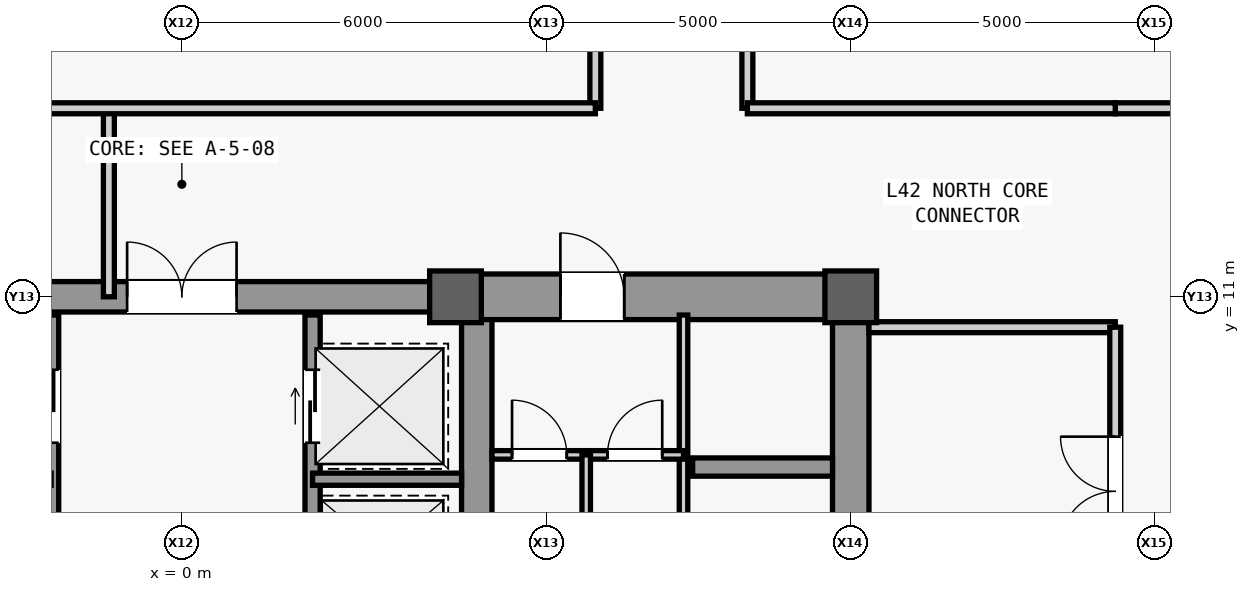
"""IFC4 building model, lengths in metres.
Left out: names, types, materials, properties, quantities, classifications, styles, units other than length and angle.
Written with IfcOpenShell. Run it as: python <this file> out.ifc"""

import sys

from ifc_helpers import new_model, si_unit, direction, frame, frame_2d, origin, origin_2d, place, context, subcontext, project, spatial, rectangle, extrude, source, transform, mapped, element, fill, save


model = new_model("IFC4")
c1 = context("Model", 3, precision=1e-05, world=origin(), true_north=direction((0.0, 1.0)))
c2 = subcontext(c1, "Body", "Model", "MODEL_VIEW")
j1 = project(units=[si_unit("LENGTHUNIT", "METRE"), si_unit("PLANEANGLEUNIT", "RADIAN")], contexts=[c1])
p1 = place(None, origin())
s1 = spatial("IfcSite", under=j1, at=p1, CompositionType="ELEMENT")
p2 = place(p1, origin())
s2 = spatial("IfcBuilding", under=s1, at=p2, CompositionType="ELEMENT")
p3 = place(p2, frame((0.0, 0.0, 183.1)))
s3 = spatial("IfcBuildingStorey", under=s2, at=p3, CompositionType="ELEMENT", Elevation=183.1)
m1 = source(origin(), c2, "Body", "SweptSolid", [
    extrude(rectangle(XDim=22.0, YDim=0.6, at=frame_2d((11.0, 0.0))), origin(), (0.0, 0.0, 1.0), 3.78),
])
p4 = place(p3, frame((11.0, -11.0, 0.0), z_axis=(0.0, 0.0, 1.0), x_axis=(0.0, 1.0, 0.0)))
e1 = element("IfcWall", 1, at=p4, inside=s3, PredefinedType="SHEAR", context=c2, shape_type="MappedRepresentation", body=[
    mapped(m1, transform((0.0, 0.0, 0.0), scale=1.0)),
])
m2 = source(origin(), c2, "Body", "SweptSolid", [
    extrude(rectangle(XDim=1.1, YDim=2.2, at=frame_2d((0.55, 1.1))), frame((0.0, 0.31, 0.0), z_axis=(0.0, -1.0, 0.0), x_axis=(1.0, 0.0, 0.0)), (0.0, 0.0, 1.0), 0.62),
])
p5 = place(p4, frame((0.8, 0.0, 0.0)))
e2 = element("IfcOpeningElement", 2, at=p5, cuts=e1, PredefinedType="OPENING", context=c2, shape_type="MappedRepresentation", body=[
    mapped(m2, transform((0.0, 0.0, 0.0), scale=1.0)),
])
m3 = source(origin(), c2, "Body", "SweptSolid", [
    extrude(rectangle(XDim=0.9, YDim=2.15, at=frame_2d((0.45, 1.075))), frame((0.0, 0.31, 0.0), z_axis=(0.0, -1.0, 0.0), x_axis=(1.0, 0.0, 0.0)), (0.0, 0.0, 1.0), 0.62),
])
p6 = place(p4, frame((6.85, 0.0, 0.0)))
e3 = element("IfcOpeningElement", 3, at=p6, cuts=e1, PredefinedType="OPENING", context=c2, shape_type="MappedRepresentation", body=[
    mapped(m3, transform((0.0, 0.0, 0.0), scale=1.0)),
])
m4 = source(origin(), c2, "Body", "SweptSolid", [
    extrude(rectangle(XDim=1.3, YDim=2.3, at=frame_2d((0.65, 1.15))), frame((0.0, 0.31, 0.0), z_axis=(0.0, -1.0, 0.0), x_axis=(1.0, 0.0, 0.0)), (0.0, 0.0, 1.0), 0.62),
])
p7 = place(p4, frame((2.7, 0.0, 0.0)))
e4 = element("IfcOpeningElement", 4, at=p7, cuts=e1, PredefinedType="OPENING", context=c2, shape_type="MappedRepresentation", body=[
    mapped(m4, transform((0.0, 0.0, 0.0), scale=1.0)),
])
p8 = place(p4, frame((13.35, 0.0, 0.0)))
e5 = element("IfcOpeningElement", 5, at=p8, cuts=e1, PredefinedType="OPENING", context=c2, shape_type="MappedRepresentation", body=[
    mapped(m4, transform((0.0, 0.0, 0.0), scale=1.0)),
])
m5 = source(origin(), c2, "Body", "SweptSolid", [
    extrude(rectangle(XDim=21.4, YDim=0.5, at=frame_2d((10.7, 0.0))), origin(), (0.0, 0.0, 1.0), 3.78),
])
p9 = place(p3, frame((4.85, -10.7, 0.0), z_axis=(0.0, 0.0, 1.0), x_axis=(0.0, 1.0, 0.0)))
e6 = element("IfcWall", 6, at=p9, inside=s3, PredefinedType="SHEAR", context=c2, shape_type="MappedRepresentation", body=[
    mapped(m5, transform((0.0, 0.0, 0.0), scale=1.0)),
])
m6 = source(origin(), c2, "Body", "SweptSolid", [
    extrude(rectangle(XDim=5.85, YDim=0.75, at=frame_2d((2.925, 0.0))), origin(), (0.0, 0.0, 1.0), 3.78),
])
p10 = place(p3, frame((4.85, 11.0, 0.0), z_axis=(0.0, 0.0, 1.0), x_axis=(1.0, 0.0, 0.0)))
e7 = element("IfcWall", 7, at=p10, inside=s3, PredefinedType="SHEAR", context=c2, shape_type="MappedRepresentation", body=[
    mapped(m6, transform((0.0, 0.0, 0.0), scale=1.0)),
])
m7 = source(origin(), c2, "Body", "SweptSolid", [
    extrude(rectangle(XDim=1.05, YDim=2.2, at=frame_2d((0.525, 1.1))), frame((0.0, 0.385, 0.0), z_axis=(0.0, -1.0, 0.0), x_axis=(1.0, 0.0, 0.0)), (0.0, 0.0, 1.0), 0.77),
])
p11 = place(p10, frame((1.375, 0.0, 0.0)))
e8 = element("IfcOpeningElement", 8, at=p11, cuts=e7, PredefinedType="OPENING", context=c2, shape_type="MappedRepresentation", body=[
    mapped(m7, transform((0.0, 0.0, 0.0), scale=1.0)),
])
m8 = source(origin(), c2, "Body", "SweptSolid", [
    extrude(rectangle(XDim=9.2, YDim=0.5, at=frame_2d((4.6, 0.0))), origin(), (0.0, 0.0, 1.0), 3.78),
])
p12 = place(p3, frame((-4.6, 11.0, 0.0), z_axis=(0.0, 0.0, 1.0), x_axis=(1.0, 0.0, 0.0)))
e9 = element("IfcWall", 9, at=p12, inside=s3, PredefinedType="SHEAR", context=c2, shape_type="MappedRepresentation", body=[
    mapped(m8, transform((0.0, 0.0, 0.0), scale=1.0)),
])
m9 = source(origin(), c2, "Body", "SweptSolid", [
    extrude(rectangle(XDim=1.8, YDim=2.25, at=frame_2d((0.9, 1.125))), frame((0.0, 0.26, 0.0), z_axis=(0.0, -1.0, 0.0), x_axis=(1.0, 0.0, 0.0)), (0.0, 0.0, 1.0), 0.52),
])
p13 = place(p12, frame((3.7, 0.0, 0.0)))
e10 = element("IfcOpeningElement", 10, at=p13, cuts=e9, PredefinedType="OPENING", context=c2, shape_type="MappedRepresentation", body=[
    mapped(m9, transform((0.0, 0.0, 0.0), scale=1.0)),
])
m10 = source(origin(), c2, "Body", "SweptSolid", [
    extrude(rectangle(XDim=0.85, YDim=0.85, at=origin_2d()), origin(), (0.0, 0.0, 1.0), 4.0),
])
for number, where, z_axis, x_axis in (
    (11, (4.5, 11.0, 0.0), (0.0, 0.0, 1.0), (1.0, 0.0, 0.0)),
    (12, (11.0, 11.0, 0.0), (0.0, 0.0, 1.0), (1.0, 0.0, 0.0)),
):
    element("IfcColumn", number, at=place(p3, frame(where, z_axis=z_axis, x_axis=x_axis)), inside=s3, PredefinedType="COLUMN", context=c2, shape_type="MappedRepresentation", body=[
        mapped(m10, transform((0.0, 0.0, 0.0), scale=1.0)),
    ])
m11 = source(origin(), c2, "Body", "SweptSolid", [
    extrude(rectangle(XDim=2.3, YDim=0.3, at=frame_2d((1.15, 0.0))), origin(), (0.0, 0.0, 1.0), 3.78),
])
p14 = place(p3, frame((8.4, 8.2, 0.0), z_axis=(0.0, 0.0, 1.0), x_axis=(1.0, 0.0, 0.0)))
e13 = element("IfcWall", 13, at=p14, inside=s3, PredefinedType="SHEAR", context=c2, shape_type="MappedRepresentation", body=[
    mapped(m11, transform((0.0, 0.0, 0.0), scale=1.0)),
])
m12 = source(origin(), c2, "Body", "SweptSolid", [
    extrude(rectangle(XDim=9.4, YDim=0.14, at=frame_2d((4.7, 0.0))), origin(), (0.0, 0.0, 1.0), 3.78),
])
p15 = place(p3, frame((8.25, 1.3, 0.0), z_axis=(0.0, 0.0, 1.0), x_axis=(0.0, 1.0, 0.0)))
e14 = element("IfcWall", 14, at=p15, inside=s3, PredefinedType="PARTITIONING", context=c2, shape_type="MappedRepresentation", body=[
    mapped(m12, transform((0.0, 0.0, 0.0), scale=1.0)),
])
m13 = source(origin(), c2, "Body", "SweptSolid", [
    extrude(rectangle(XDim=3.15, YDim=0.14, at=frame_2d((1.575, 0.0))), origin(), (0.0, 0.0, 1.0), 3.78),
])
p16 = place(p3, frame((5.1, 8.4, 0.0), z_axis=(0.0, 0.0, 1.0), x_axis=(1.0, 0.0, 0.0)))
e15 = element("IfcWall", 15, at=p16, inside=s3, PredefinedType="PARTITIONING", context=c2, shape_type="MappedRepresentation", body=[
    mapped(m13, transform((0.0, 0.0, 0.0), scale=1.0)),
])
m14 = source(origin(), c2, "Body", "SweptSolid", [
    extrude(rectangle(XDim=0.9, YDim=2.15, at=frame_2d((0.45, 1.075))), frame((0.0, 0.08, 0.0), z_axis=(0.0, -1.0, 0.0), x_axis=(1.0, 0.0, 0.0)), (0.0, 0.0, 1.0), 0.16),
])
p17 = place(p16, frame((0.33, 0.0, 0.0)))
e16 = element("IfcOpeningElement", 16, at=p17, cuts=e15, PredefinedType="OPENING", context=c2, shape_type="MappedRepresentation", body=[
    mapped(m14, transform((0.0, 0.0, 0.0), scale=1.0)),
])
p18 = place(p16, frame((1.9, 0.0, 0.0)))
e17 = element("IfcOpeningElement", 17, at=p18, cuts=e15, PredefinedType="OPENING", context=c2, shape_type="MappedRepresentation", body=[
    mapped(m14, transform((0.0, 0.0, 0.0), scale=1.0)),
])
m15 = source(origin(), c2, "Body", "SweptSolid", [
    extrude(rectangle(XDim=7.1, YDim=0.14, at=frame_2d((3.55, 0.0))), origin(), (0.0, 0.0, 1.0), 3.78),
])
p19 = place(p3, frame((6.65, 1.3, 0.0), z_axis=(0.0, 0.0, 1.0), x_axis=(0.0, 1.0, 0.0)))
e18 = element("IfcWall", 18, at=p19, inside=s3, PredefinedType="PARTITIONING", context=c2, shape_type="MappedRepresentation", body=[
    mapped(m15, transform((0.0, 0.0, 0.0), scale=1.0)),
])
p20 = place(p19, frame((1.3, 0.0, 0.0)))
e19 = element("IfcOpeningElement", 19, at=p20, cuts=e18, PredefinedType="OPENING", context=c2, shape_type="MappedRepresentation", body=[
    mapped(m14, transform((0.0, 0.0, 0.0), scale=1.0)),
])
m16 = source(origin(), c2, "Body", "SweptSolid", [
    extrude(rectangle(XDim=4.05, YDim=0.18, at=frame_2d((2.025, 0.0))), origin(), (0.0, 0.0, 1.0), 3.78),
])
p21 = place(p3, frame((11.3, 10.5, 0.0), z_axis=(0.0, 0.0, 1.0), x_axis=(1.0, 0.0, 0.0)))
e20 = element("IfcWall", 20, at=p21, inside=s3, PredefinedType="PARTITIONING", context=c2, shape_type="MappedRepresentation", body=[
    mapped(m16, transform((0.0, 0.0, 0.0), scale=1.0)),
])
m17 = source(origin(), c2, "Body", "SweptSolid", [
    extrude(rectangle(XDim=16.6, YDim=0.18, at=frame_2d((8.3, 0.0))), origin(), (0.0, 0.0, 1.0), 3.78),
])
p22 = place(p3, frame((15.35, -6.1, 0.0), z_axis=(0.0, 0.0, 1.0), x_axis=(0.0, 1.0, 0.0)))
e21 = element("IfcWall", 21, at=p22, inside=s3, PredefinedType="PARTITIONING", context=c2, shape_type="MappedRepresentation", body=[
    mapped(m17, transform((0.0, 0.0, 0.0), scale=1.0)),
])
m18 = source(origin(), c2, "Body", "SweptSolid", [
    extrude(rectangle(XDim=1.8, YDim=2.25, at=frame_2d((0.9, 1.125))), frame((0.0, 0.1, 0.0), z_axis=(0.0, -1.0, 0.0), x_axis=(1.0, 0.0, 0.0)), (0.0, 0.0, 1.0), 0.2),
])
p23 = place(p22, frame((2.7, 0.0, 0.0)))
e22 = element("IfcOpeningElement", 22, at=p23, cuts=e21, PredefinedType="OPENING", context=c2, shape_type="MappedRepresentation", body=[
    mapped(m18, transform((0.0, 0.0, 0.0), scale=1.0)),
])
p24 = place(p22, frame((13.0, 0.0, 0.0)))
e23 = element("IfcOpeningElement", 23, at=p24, cuts=e21, PredefinedType="OPENING", context=c2, shape_type="MappedRepresentation", body=[
    mapped(m18, transform((0.0, 0.0, 0.0), scale=1.0)),
])
m19 = source(origin(), c2, "Body", "SweptSolid", [
    extrude(rectangle(XDim=5.4, YDim=0.25, at=frame_2d((2.7, 0.0))), origin(), (0.0, 0.0, 1.0), 3.78),
])
p25 = place(p3, frame((-2.15, 5.3, 0.0), z_axis=(0.0, 0.0, 1.0), x_axis=(0.0, 1.0, 0.0)))
e24 = element("IfcWall", 24, at=p25, inside=s3, PredefinedType="SHEAR", context=c2, shape_type="MappedRepresentation", body=[
    mapped(m19, transform((0.0, 0.0, 0.0), scale=1.0)),
])
m20 = source(origin(), c2, "Body", "SweptSolid", [
    extrude(rectangle(XDim=1.2, YDim=2.3, at=frame_2d((0.6, 1.15))), frame((0.0, 0.135, 0.0), z_axis=(0.0, -1.0, 0.0), x_axis=(1.0, 0.0, 0.0)), (0.0, 0.0, 1.0), 0.27),
])
p26 = place(p25, frame((3.3, 0.0, 0.0)))
e25 = element("IfcOpeningElement", 25, at=p26, cuts=e24, PredefinedType="OPENING", context=c2, shape_type="MappedRepresentation", body=[
    mapped(m20, transform((0.0, 0.0, 0.0), scale=1.0)),
])
p27 = place(p25, frame((0.9, 0.0, 0.0)))
e26 = element("IfcOpeningElement", 26, at=p27, cuts=e24, PredefinedType="OPENING", context=c2, shape_type="MappedRepresentation", body=[
    mapped(m20, transform((0.0, 0.0, 0.0), scale=1.0)),
])
p28 = place(p3, frame((2.15, 5.3, 0.0), z_axis=(0.0, 0.0, 1.0), x_axis=(0.0, 1.0, 0.0)))
e27 = element("IfcWall", 27, at=p28, inside=s3, PredefinedType="SHEAR", context=c2, shape_type="MappedRepresentation", body=[
    mapped(m19, transform((0.0, 0.0, 0.0), scale=1.0)),
])
p29 = place(p28, frame((3.3, 0.0, 0.0)))
e28 = element("IfcOpeningElement", 28, at=p29, cuts=e27, PredefinedType="OPENING", context=c2, shape_type="MappedRepresentation", body=[
    mapped(m20, transform((0.0, 0.0, 0.0), scale=1.0)),
])
p30 = place(p28, frame((0.9, 0.0, 0.0)))
e29 = element("IfcOpeningElement", 29, at=p30, cuts=e27, PredefinedType="OPENING", context=c2, shape_type="MappedRepresentation", body=[
    mapped(m20, transform((0.0, 0.0, 0.0), scale=1.0)),
])
m21 = source(origin(), c2, "Body", "SweptSolid", [
    extrude(rectangle(XDim=2.45, YDim=0.2, at=frame_2d((1.225, 0.0))), origin(), (0.0, 0.0, 1.0), 3.78),
])
p31 = place(p3, frame((2.15, 8.0, 0.0), z_axis=(0.0, 0.0, 1.0), x_axis=(1.0, 0.0, 0.0)))
e30 = element("IfcWall", 30, at=p31, inside=s3, PredefinedType="SHEAR", context=c2, shape_type="MappedRepresentation", body=[
    mapped(m21, transform((0.0, 0.0, 0.0), scale=1.0)),
])
m22 = source(origin(), c2, "Body", "SweptSolid", [
    extrude(rectangle(XDim=2.45, YDim=0.18, at=frame_2d((1.225, 0.0))), origin(), (0.0, 0.0, 1.0), 3.78),
])
p32 = place(p3, frame((15.35, 14.1, 0.0), z_axis=(0.0, 0.0, 1.0), x_axis=(1.0, 0.0, 0.0)))
e31 = element("IfcWall", 31, at=p32, inside=s3, PredefinedType="PARTITIONING", context=c2, shape_type="MappedRepresentation", body=[
    mapped(m22, transform((0.0, 0.0, 0.0), scale=1.0)),
])
m23 = source(origin(), c2, "Body", "SweptSolid", [
    extrude(rectangle(XDim=3.1, YDim=0.18, at=frame_2d((1.55, 0.0))), origin(), (0.0, 0.0, 1.0), 3.78),
])
p33 = place(p3, frame((-1.2, 11.0, 0.0), z_axis=(0.0, 0.0, 1.0), x_axis=(0.0, 1.0, 0.0)))
e32 = element("IfcWall", 32, at=p33, inside=s3, PredefinedType="PARTITIONING", context=c2, shape_type="MappedRepresentation", body=[
    mapped(m23, transform((0.0, 0.0, 0.0), scale=1.0)),
])
m24 = source(origin(), c2, "Body", "SweptSolid", [
    extrude(rectangle(XDim=15.9, YDim=0.18, at=frame_2d((7.95, 0.0))), origin(), (0.0, 0.0, 1.0), 3.78),
])
p34 = place(p3, frame((6.8, 14.1, 0.0), z_axis=(0.0, 0.0, 1.0), x_axis=(0.0, 1.0, 0.0)))
e33 = element("IfcWall", 33, at=p34, inside=s3, PredefinedType="PARTITIONING", context=c2, shape_type="MappedRepresentation", body=[
    mapped(m24, transform((0.0, 0.0, 0.0), scale=1.0)),
])
m25 = source(origin(), c2, "Body", "SweptSolid", [
    extrude(rectangle(XDim=1.05, YDim=2.2, at=frame_2d((0.525, 1.1))), frame((0.0, 0.1, 0.0), z_axis=(0.0, -1.0, 0.0), x_axis=(1.0, 0.0, 0.0)), (0.0, 0.0, 1.0), 0.2),
])
p35 = place(p34, frame((11.4, 0.0, 0.0)))
e34 = element("IfcOpeningElement", 34, at=p35, cuts=e33, PredefinedType="OPENING", context=c2, shape_type="MappedRepresentation", body=[
    mapped(m25, transform((0.0, 0.0, 0.0), scale=1.0)),
])
m26 = source(origin(), c2, "Body", "SweptSolid", [
    extrude(rectangle(XDim=22.15, YDim=0.18, at=frame_2d((11.075, 0.0))), origin(), (0.0, 0.0, 1.0), 3.78),
])
p36 = place(p3, frame((-15.35, 14.1, 0.0), z_axis=(0.0, 0.0, 1.0), x_axis=(1.0, 0.0, 0.0)))
e35 = element("IfcWall", 35, at=p36, inside=s3, PredefinedType="PARTITIONING", context=c2, shape_type="MappedRepresentation", body=[
    mapped(m26, transform((0.0, 0.0, 0.0), scale=1.0)),
])
p37 = place(p3, frame((9.3, 14.1, 0.0), z_axis=(0.0, 0.0, 1.0), x_axis=(0.0, 1.0, 0.0)))
e36 = element("IfcWall", 36, at=p37, inside=s3, PredefinedType="PARTITIONING", context=c2, shape_type="MappedRepresentation", body=[
    mapped(m24, transform((0.0, 0.0, 0.0), scale=1.0)),
])
p38 = place(p37, frame((11.4, 0.0, 0.0)))
e37 = element("IfcOpeningElement", 37, at=p38, cuts=e36, PredefinedType="OPENING", context=c2, shape_type="MappedRepresentation", body=[
    mapped(m25, transform((0.0, 0.0, 0.0), scale=1.0)),
])
m27 = source(origin(), c2, "Body", "SweptSolid", [
    extrude(rectangle(XDim=6.05, YDim=0.18, at=frame_2d((3.025, 0.0))), origin(), (0.0, 0.0, 1.0), 3.78),
])
p39 = place(p3, frame((9.3, 14.1, 0.0), z_axis=(0.0, 0.0, 1.0), x_axis=(1.0, 0.0, 0.0)))
e38 = element("IfcWall", 38, at=p39, inside=s3, PredefinedType="PARTITIONING", context=c2, shape_type="MappedRepresentation", body=[
    mapped(m27, transform((0.0, 0.0, 0.0), scale=1.0)),
])
m28 = source(origin(), c2, "Body", "SweptSolid", [
    extrude(rectangle(XDim=1.05, YDim=2.2, at=frame_2d((0.525, 1.1))), frame((0.0, 0.025, 0.0), z_axis=(0.0, -1.0, 0.0), x_axis=(1.0, 0.0, 0.0)), (0.0, 0.0, 1.0), 0.05),
])
p40 = place(p11, origin())
e39 = element("IfcDoor", 39, at=p40, inside=s3, OperationType="SINGLE_SWING_LEFT", PredefinedType="DOOR", context=c2, shape_type="MappedRepresentation", body=[
    mapped(m28, transform((0.0, 0.0, 0.0), scale=1.0)),
])
fill(e8, e39)
m29 = source(origin(), c2, "Body", "SweptSolid", [
    extrude(rectangle(XDim=0.9, YDim=2.15, at=frame_2d((0.45, 1.075))), frame((0.0, 0.025, 0.0), z_axis=(0.0, -1.0, 0.0), x_axis=(1.0, 0.0, 0.0)), (0.0, 0.0, 1.0), 0.05),
])
p41 = place(p17, origin())
e40 = element("IfcDoor", 40, at=p41, inside=s3, OperationType="SINGLE_SWING_LEFT", PredefinedType="DOOR", context=c2, shape_type="MappedRepresentation", body=[
    mapped(m29, transform((0.0, 0.0, 0.0), scale=1.0)),
])
fill(e16, e40)
p42 = place(p18, origin())
e41 = element("IfcDoor", 41, at=p42, inside=s3, OperationType="SINGLE_SWING_RIGHT", PredefinedType="DOOR", context=c2, shape_type="MappedRepresentation", body=[
    mapped(m29, transform((0.0, 0.0, 0.0), scale=1.0)),
])
fill(e17, e41)
m30 = source(origin(), c2, "Body", "SweptSolid", [
    extrude(rectangle(XDim=1.8, YDim=2.25, at=frame_2d((0.9, 1.125))), frame((0.0, 0.025, 0.0), z_axis=(0.0, -1.0, 0.0), x_axis=(1.0, 0.0, 0.0)), (0.0, 0.0, 1.0), 0.05),
])
p43 = place(p24, origin())
e42 = element("IfcDoor", 42, at=p43, inside=s3, OperationType="SINGLE_SWING_LEFT", PredefinedType="DOOR", context=c2, shape_type="MappedRepresentation", body=[
    mapped(m30, transform((0.0, 0.0, 0.0), scale=1.0)),
])
fill(e23, e42)
p44 = place(p13, origin())
e43 = element("IfcDoor", 43, at=p44, inside=s3, OperationType="SINGLE_SWING_RIGHT", PredefinedType="DOOR", context=c2, shape_type="MappedRepresentation", body=[
    mapped(m30, transform((0.0, 0.0, 0.0), scale=1.0)),
])
fill(e10, e43)
m31 = source(origin(), c2, "Body", "SweptSolid", [
    extrude(rectangle(XDim=1.2, YDim=2.3, at=frame_2d((0.6, 1.15))), frame((0.0, 0.025, 0.0), z_axis=(0.0, -1.0, 0.0), x_axis=(1.0, 0.0, 0.0)), (0.0, 0.0, 1.0), 0.05),
])
p45 = place(p29, origin())
e44 = element("IfcDoor", 44, at=p45, inside=s3, OperationType="SLIDING_TO_LEFT", PredefinedType="DOOR", context=c2, shape_type="MappedRepresentation", body=[
    mapped(m31, transform((0.0, 0.0, 0.0), scale=1.0)),
])
fill(e28, e44)
save(model, sys.argv[1])
